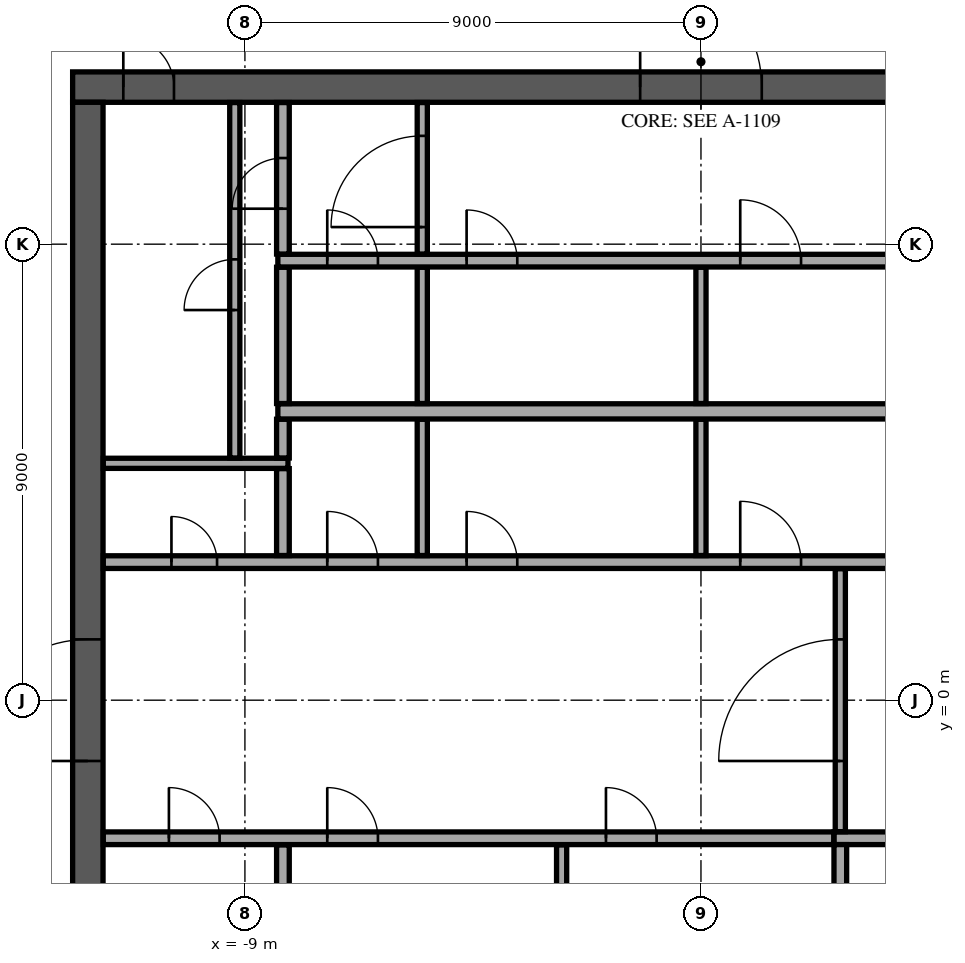
"""IFC4 building model, lengths in metres.
Left out: names, types, materials, properties, quantities, classifications, styles, units other than length and angle.
Written with IfcOpenShell. Run it as: python <this file> out.ifc"""

import sys

from ifc_helpers import new_model, si_unit, direction, frame, frame_2d, origin, place, context, subcontext, project, spatial, rectangle, extrude, element, fill, save


model = new_model("IFC4")
c1 = context("Model", 3, precision=1e-05, world=origin(), true_north=direction((0.0, 1.0)))
c2 = subcontext(c1, "Body", "Model", "MODEL_VIEW")
j1 = project(units=[si_unit("LENGTHUNIT", "METRE"), si_unit("PLANEANGLEUNIT", "RADIAN")], contexts=[c1])
p1 = place(None, origin())
s1 = spatial("IfcSite", under=j1, at=p1, CompositionType="ELEMENT")
p2 = place(p1, origin())
s2 = spatial("IfcBuilding", under=s1, at=p2, CompositionType="ELEMENT")
p3 = place(p2, frame((0.0, 0.0, 350.1)))
s3 = spatial("IfcBuildingStorey", under=s2, at=p3, CompositionType="ELEMENT", Elevation=350.1)
p4 = place(p3, frame((-12.4, 12.1, 0.0), z_axis=(0.0, 0.0, 1.0), x_axis=(1.0, 0.0, 0.0)))
e1 = element("IfcWall", 1, at=p4, inside=s3, PredefinedType="SHEAR", context=c2, shape_type="SweptSolid", body=[
    extrude(rectangle(XDim=24.8, YDim=0.6, at=frame_2d((12.4, 0.0))), origin(), (0.0, 0.0, 1.0), 7.7),
])
p5 = place(p4, frame((11.2, 0.0, 0.0)))
e2 = element("IfcOpeningElement", 2, at=p5, cuts=e1, PredefinedType="OPENING", context=c2, shape_type="SweptSolid", body=[
    extrude(rectangle(XDim=2.4, YDim=2.4, at=frame_2d((1.2, 1.2))), frame((0.0, 0.31, 0.0), z_axis=(0.0, -1.0, 0.0), x_axis=(1.0, 0.0, 0.0)), (0.0, 0.0, 1.0), 0.62),
])
p6 = place(p4, frame((22.025, 0.0, 0.0)))
e3 = element("IfcOpeningElement", 3, at=p6, cuts=e1, PredefinedType="OPENING", context=c2, shape_type="SweptSolid", body=[
    extrude(rectangle(XDim=1.2, YDim=2.1, at=frame_2d((0.6, 1.05))), frame((0.0, 0.31, 0.0), z_axis=(0.0, -1.0, 0.0), x_axis=(1.0, 0.0, 0.0)), (0.0, 0.0, 1.0), 0.62),
])
p7 = place(p4, frame((1.0, 0.0, 0.0)))
e4 = element("IfcOpeningElement", 4, at=p7, cuts=e1, PredefinedType="OPENING", context=c2, shape_type="SweptSolid", body=[
    extrude(rectangle(XDim=1.0, YDim=2.1, at=frame_2d((0.5, 1.05))), frame((0.0, 0.31, 0.0), z_axis=(0.0, -1.0, 0.0), x_axis=(1.0, 0.0, 0.0)), (0.0, 0.0, 1.0), 0.62),
])
p8 = place(p3, frame((-12.1, -11.8, 0.0), z_axis=(0.0, 0.0, 1.0), x_axis=(0.0, 1.0, 0.0)))
e5 = element("IfcWall", 5, at=p8, inside=s3, PredefinedType="SHEAR", context=c2, shape_type="SweptSolid", body=[
    extrude(rectangle(XDim=23.6, YDim=0.6, at=frame_2d((11.8, 0.0))), origin(), (0.0, 0.0, 1.0), 7.7),
])
p9 = place(p8, frame((10.6, 0.0, 0.0)))
e6 = element("IfcOpeningElement", 6, at=p9, cuts=e5, PredefinedType="OPENING", context=c2, shape_type="SweptSolid", body=[
    extrude(rectangle(XDim=2.4, YDim=2.4, at=frame_2d((1.2, 1.2))), frame((0.0, 0.31, 0.0), z_axis=(0.0, -1.0, 0.0), x_axis=(1.0, 0.0, 0.0)), (0.0, 0.0, 1.0), 0.62),
])
p10 = place(p3, frame((2.625, -2.725, 0.0), z_axis=(0.0, 0.0, 1.0), x_axis=(1.0, 0.0, 0.0)))
e7 = element("IfcWall", 7, at=p10, inside=s3, PredefinedType="SOLIDWALL", context=c2, shape_type="SweptSolid", body=[
    extrude(rectangle(XDim=3.0, YDim=0.25, at=frame_2d((1.5, 0.0))), origin(), (0.0, 0.0, 1.0), 7.7),
])
p11 = place(p3, frame((2.75, -5.55, 0.0), z_axis=(0.0, 0.0, 1.0), x_axis=(0.0, 1.0, 0.0)))
e8 = element("IfcWall", 8, at=p11, inside=s3, PredefinedType="SOLIDWALL", context=c2, shape_type="SweptSolid", body=[
    extrude(rectangle(XDim=2.7, YDim=0.25, at=frame_2d((1.35, 0.0))), origin(), (0.0, 0.0, 1.0), 7.7),
])
p12 = place(p3, frame((-8.25, -5.545, 0.0), z_axis=(0.0, 0.0, 1.0), x_axis=(0.0, 1.0, 0.0)))
e9 = element("IfcWall", 9, at=p12, inside=s3, PredefinedType="PARTITIONING", context=c2, shape_type="SweptSolid", body=[
    extrude(rectangle(XDim=2.69, YDim=0.25, at=frame_2d((1.345, 0.0))), origin(), (0.0, 0.0, 1.0), 7.7),
])
p13 = place(p3, frame((-2.75, -5.545, 0.0), z_axis=(0.0, 0.0, 1.0), x_axis=(0.0, 1.0, 0.0)))
e10 = element("IfcWall", 10, at=p13, inside=s3, PredefinedType="PARTITIONING", context=c2, shape_type="SweptSolid", body=[
    extrude(rectangle(XDim=2.69, YDim=0.2, at=frame_2d((1.345, 0.0))), origin(), (0.0, 0.0, 1.0), 7.7),
])
p14 = place(p3, frame((-11.795, -2.725, 0.0), z_axis=(0.0, 0.0, 1.0), x_axis=(1.0, 0.0, 0.0)))
e11 = element("IfcWall", 11, at=p14, inside=s3, PredefinedType="PARTITIONING", context=c2, shape_type="SweptSolid", body=[
    extrude(rectangle(XDim=14.415, YDim=0.25, at=frame_2d((7.208, 0.0))), origin(), (0.0, 0.0, 1.0), 7.7),
])
p15 = place(p14, frame((1.295, 0.0, 0.0)))
e12 = element("IfcOpeningElement", 12, at=p15, cuts=e11, PredefinedType="OPENING", context=c2, shape_type="SweptSolid", body=[
    extrude(rectangle(XDim=1.0, YDim=2.1, at=frame_2d((0.5, 1.05))), frame((0.0, 0.135, 0.0), z_axis=(0.0, -1.0, 0.0), x_axis=(1.0, 0.0, 0.0)), (0.0, 0.0, 1.0), 0.27),
])
p16 = place(p14, frame((4.42, 0.0, 0.0)))
e13 = element("IfcOpeningElement", 13, at=p16, cuts=e11, PredefinedType="OPENING", context=c2, shape_type="SweptSolid", body=[
    extrude(rectangle(XDim=1.0, YDim=2.1, at=frame_2d((0.5, 1.05))), frame((0.0, 0.135, 0.0), z_axis=(0.0, -1.0, 0.0), x_axis=(1.0, 0.0, 0.0)), (0.0, 0.0, 1.0), 0.27),
])
p17 = place(p14, frame((9.92, 0.0, 0.0)))
e14 = element("IfcOpeningElement", 14, at=p17, cuts=e11, PredefinedType="OPENING", context=c2, shape_type="SweptSolid", body=[
    extrude(rectangle(XDim=1.0, YDim=2.1, at=frame_2d((0.5, 1.05))), frame((0.0, 0.135, 0.0), z_axis=(0.0, -1.0, 0.0), x_axis=(1.0, 0.0, 0.0)), (0.0, 0.0, 1.0), 0.27),
])
p18 = place(p3, frame((2.75, -2.595, 0.0), z_axis=(0.0, 0.0, 1.0), x_axis=(0.0, 1.0, 0.0)))
e15 = element("IfcWall", 15, at=p18, inside=s3, PredefinedType="PARTITIONING", context=c2, shape_type="SweptSolid", body=[
    extrude(rectangle(XDim=5.19, YDim=0.2, at=frame_2d((2.595, 0.0))), origin(), (0.0, 0.0, 1.0), 7.7),
])
p19 = place(p18, frame((1.395, 0.0, 0.0)))
e16 = element("IfcOpeningElement", 16, at=p19, cuts=e15, PredefinedType="OPENING", context=c2, shape_type="SweptSolid", body=[
    extrude(rectangle(XDim=2.4, YDim=2.4, at=frame_2d((1.2, 1.2))), frame((0.0, 0.11, 0.0), z_axis=(0.0, -1.0, 0.0), x_axis=(1.0, 0.0, 0.0)), (0.0, 0.0, 1.0), 0.22),
])
p20 = place(p3, frame((-11.795, 2.725, 0.0), z_axis=(0.0, 0.0, 1.0), x_axis=(1.0, 0.0, 0.0)))
e17 = element("IfcWall", 17, at=p20, inside=s3, PredefinedType="PARTITIONING", context=c2, shape_type="SweptSolid", body=[
    extrude(rectangle(XDim=23.59, YDim=0.25, at=frame_2d((11.795, 0.0))), origin(), (0.0, 0.0, 1.0), 7.7),
])
p21 = place(p20, frame((21.345, 0.0, 0.0)))
e18 = element("IfcOpeningElement", 18, at=p21, cuts=e17, PredefinedType="OPENING", context=c2, shape_type="SweptSolid", body=[
    extrude(rectangle(XDim=0.9, YDim=2.1, at=frame_2d((0.45, 1.05))), frame((0.0, 0.135, 0.0), z_axis=(0.0, -1.0, 0.0), x_axis=(1.0, 0.0, 0.0)), (0.0, 0.0, 1.0), 0.27),
])
p22 = place(p20, frame((1.345, 0.0, 0.0)))
e19 = element("IfcOpeningElement", 19, at=p22, cuts=e17, PredefinedType="OPENING", context=c2, shape_type="SweptSolid", body=[
    extrude(rectangle(XDim=0.9, YDim=2.1, at=frame_2d((0.45, 1.05))), frame((0.0, 0.135, 0.0), z_axis=(0.0, -1.0, 0.0), x_axis=(1.0, 0.0, 0.0)), (0.0, 0.0, 1.0), 0.27),
])
p23 = place(p20, frame((4.42, 0.0, 0.0)))
e20 = element("IfcOpeningElement", 20, at=p23, cuts=e17, PredefinedType="OPENING", context=c2, shape_type="SweptSolid", body=[
    extrude(rectangle(XDim=1.0, YDim=2.1, at=frame_2d((0.5, 1.05))), frame((0.0, 0.135, 0.0), z_axis=(0.0, -1.0, 0.0), x_axis=(1.0, 0.0, 0.0)), (0.0, 0.0, 1.0), 0.27),
])
p24 = place(p20, frame((7.17, 0.0, 0.0)))
e21 = element("IfcOpeningElement", 21, at=p24, cuts=e17, PredefinedType="OPENING", context=c2, shape_type="SweptSolid", body=[
    extrude(rectangle(XDim=1.0, YDim=2.1, at=frame_2d((0.5, 1.05))), frame((0.0, 0.135, 0.0), z_axis=(0.0, -1.0, 0.0), x_axis=(1.0, 0.0, 0.0)), (0.0, 0.0, 1.0), 0.27),
])
p25 = place(p20, frame((12.57, 0.0, 0.0)))
e22 = element("IfcOpeningElement", 22, at=p25, cuts=e17, PredefinedType="OPENING", context=c2, shape_type="SweptSolid", body=[
    extrude(rectangle(XDim=1.2, YDim=2.1, at=frame_2d((0.6, 1.05))), frame((0.0, 0.135, 0.0), z_axis=(0.0, -1.0, 0.0), x_axis=(1.0, 0.0, 0.0)), (0.0, 0.0, 1.0), 0.27),
])
p26 = place(p3, frame((-8.25, 2.855, 0.0), z_axis=(0.0, 0.0, 1.0), x_axis=(0.0, 1.0, 0.0)))
e23 = element("IfcWall", 23, at=p26, inside=s3, PredefinedType="PARTITIONING", context=c2, shape_type="SweptSolid", body=[
    extrude(rectangle(XDim=1.715, YDim=0.25, at=frame_2d((0.857, 0.0))), origin(), (0.0, 0.0, 1.0), 7.7),
])
for number, where, z_axis, x_axis in (
    (24, (-5.5, 2.855, 0.0), (0.0, 0.0, 1.0), (0.0, 1.0, 0.0)),
    (25, (0.0, 2.855, 0.0), (0.0, 0.0, 1.0), (0.0, 1.0, 0.0)),
):
    element("IfcWall", number, at=place(p3, frame(where, z_axis=z_axis, x_axis=x_axis)), inside=s3, PredefinedType="PARTITIONING", context=c2, shape_type="SweptSolid", body=[
        extrude(rectangle(XDim=2.69, YDim=0.2, at=frame_2d((1.345, 0.0))), origin(), (0.0, 0.0, 1.0), 7.7),
    ])
p27 = place(p3, frame((-11.795, 4.675, 0.0), z_axis=(0.0, 0.0, 1.0), x_axis=(1.0, 0.0, 0.0)))
e26 = element("IfcWall", 26, at=p27, inside=s3, PredefinedType="PARTITIONING", context=c2, shape_type="SweptSolid", body=[
    extrude(rectangle(XDim=3.645, YDim=0.2, at=frame_2d((1.823, 0.0))), origin(), (0.0, 0.0, 1.0), 7.7),
])
p28 = place(p3, frame((-9.2, 4.78, 0.0), z_axis=(0.0, 0.0, 1.0), x_axis=(0.0, 1.0, 0.0)))
e27 = element("IfcWall", 27, at=p28, inside=s3, PredefinedType="PARTITIONING", context=c2, shape_type="SweptSolid", body=[
    extrude(rectangle(XDim=7.015, YDim=0.2, at=frame_2d((3.507, 0.0))), origin(), (0.0, 0.0, 1.0), 7.7),
])
p29 = place(p28, frame((2.92, 0.0, 0.0)))
e28 = element("IfcOpeningElement", 28, at=p29, cuts=e27, PredefinedType="OPENING", context=c2, shape_type="SweptSolid", body=[
    extrude(rectangle(XDim=1.0, YDim=2.1, at=frame_2d((0.5, 1.05))), frame((0.0, 0.11, 0.0), z_axis=(0.0, -1.0, 0.0), x_axis=(1.0, 0.0, 0.0)), (0.0, 0.0, 1.0), 0.22),
])
p30 = place(p3, frame((-8.25, 4.78, 0.0), z_axis=(0.0, 0.0, 1.0), x_axis=(0.0, 1.0, 0.0)))
e29 = element("IfcWall", 29, at=p30, inside=s3, PredefinedType="PARTITIONING", context=c2, shape_type="SweptSolid", body=[
    extrude(rectangle(XDim=0.765, YDim=0.25, at=frame_2d((0.382, 0.0))), origin(), (0.0, 0.0, 1.0), 7.7),
])
p31 = place(p3, frame((-8.35, 5.7, 0.0), z_axis=(0.0, 0.0, 1.0), x_axis=(1.0, 0.0, 0.0)))
e30 = element("IfcWall", 30, at=p31, inside=s3, PredefinedType="PARTITIONING", context=c2, shape_type="SweptSolid", body=[
    extrude(rectangle(XDim=16.7, YDim=0.3, at=frame_2d((8.35, 0.0))), origin(), (0.0, 0.0, 1.0), 7.7),
])
p32 = place(p3, frame((-8.25, 5.855, 0.0), z_axis=(0.0, 0.0, 1.0), x_axis=(0.0, 1.0, 0.0)))
e31 = element("IfcWall", 31, at=p32, inside=s3, PredefinedType="PARTITIONING", context=c2, shape_type="SweptSolid", body=[
    extrude(rectangle(XDim=2.69, YDim=0.25, at=frame_2d((1.345, 0.0))), origin(), (0.0, 0.0, 1.0), 7.7),
])
for number, where, z_axis, x_axis in (
    (32, (-5.5, 5.855, 0.0), (0.0, 0.0, 1.0), (0.0, 1.0, 0.0)),
    (33, (0.0, 5.855, 0.0), (0.0, 0.0, 1.0), (0.0, 1.0, 0.0)),
):
    element("IfcWall", number, at=place(p3, frame(where, z_axis=z_axis, x_axis=x_axis)), inside=s3, PredefinedType="PARTITIONING", context=c2, shape_type="SweptSolid", body=[
        extrude(rectangle(XDim=2.69, YDim=0.2, at=frame_2d((1.345, 0.0))), origin(), (0.0, 0.0, 1.0), 7.7),
    ])
p33 = place(p3, frame((-8.35, 8.675, 0.0), z_axis=(0.0, 0.0, 1.0), x_axis=(1.0, 0.0, 0.0)))
e34 = element("IfcWall", 34, at=p33, inside=s3, PredefinedType="PARTITIONING", context=c2, shape_type="SweptSolid", body=[
    extrude(rectangle(XDim=16.72, YDim=0.25, at=frame_2d((8.36, 0.0))), origin(), (0.0, 0.0, 1.0), 7.7),
])
p34 = place(p33, frame((0.975, 0.0, 0.0)))
e35 = element("IfcOpeningElement", 35, at=p34, cuts=e34, PredefinedType="OPENING", context=c2, shape_type="SweptSolid", body=[
    extrude(rectangle(XDim=1.0, YDim=2.1, at=frame_2d((0.5, 1.05))), frame((0.0, 0.135, 0.0), z_axis=(0.0, -1.0, 0.0), x_axis=(1.0, 0.0, 0.0)), (0.0, 0.0, 1.0), 0.27),
])
p35 = place(p33, frame((3.725, 0.0, 0.0)))
e36 = element("IfcOpeningElement", 36, at=p35, cuts=e34, PredefinedType="OPENING", context=c2, shape_type="SweptSolid", body=[
    extrude(rectangle(XDim=1.0, YDim=2.1, at=frame_2d((0.5, 1.05))), frame((0.0, 0.135, 0.0), z_axis=(0.0, -1.0, 0.0), x_axis=(1.0, 0.0, 0.0)), (0.0, 0.0, 1.0), 0.27),
])
p36 = place(p33, frame((9.125, 0.0, 0.0)))
e37 = element("IfcOpeningElement", 37, at=p36, cuts=e34, PredefinedType="OPENING", context=c2, shape_type="SweptSolid", body=[
    extrude(rectangle(XDim=1.2, YDim=2.1, at=frame_2d((0.6, 1.05))), frame((0.0, 0.135, 0.0), z_axis=(0.0, -1.0, 0.0), x_axis=(1.0, 0.0, 0.0)), (0.0, 0.0, 1.0), 0.27),
])
p37 = place(p3, frame((-8.25, 8.805, 0.0), z_axis=(0.0, 0.0, 1.0), x_axis=(0.0, 1.0, 0.0)))
e38 = element("IfcWall", 38, at=p37, inside=s3, PredefinedType="PARTITIONING", context=c2, shape_type="SweptSolid", body=[
    extrude(rectangle(XDim=2.99, YDim=0.25, at=frame_2d((1.495, 0.0))), origin(), (0.0, 0.0, 1.0), 7.7),
])
p38 = place(p37, frame((0.895, 0.0, 0.0)))
e39 = element("IfcOpeningElement", 39, at=p38, cuts=e38, PredefinedType="OPENING", context=c2, shape_type="SweptSolid", body=[
    extrude(rectangle(XDim=1.0, YDim=2.1, at=frame_2d((0.5, 1.05))), frame((0.0, 0.135, 0.0), z_axis=(0.0, -1.0, 0.0), x_axis=(1.0, 0.0, 0.0)), (0.0, 0.0, 1.0), 0.27),
])
p39 = place(p3, frame((-5.5, 8.805, 0.0), z_axis=(0.0, 0.0, 1.0), x_axis=(0.0, 1.0, 0.0)))
e40 = element("IfcWall", 40, at=p39, inside=s3, PredefinedType="PARTITIONING", context=c2, shape_type="SweptSolid", body=[
    extrude(rectangle(XDim=2.99, YDim=0.2, at=frame_2d((1.495, 0.0))), origin(), (0.0, 0.0, 1.0), 7.7),
])
p40 = place(p39, frame((0.532, 0.0, 0.0)))
e41 = element("IfcOpeningElement", 41, at=p40, cuts=e40, PredefinedType="OPENING", context=c2, shape_type="SweptSolid", body=[
    extrude(rectangle(XDim=1.8, YDim=2.1, at=frame_2d((0.9, 1.05))), frame((0.0, 0.11, 0.0), z_axis=(0.0, -1.0, 0.0), x_axis=(1.0, 0.0, 0.0)), (0.0, 0.0, 1.0), 0.22),
])
p41 = place(p5, origin())
e42 = element("IfcDoor", 42, at=p41, inside=s3, OperationType="SINGLE_SWING_LEFT", PredefinedType="DOOR", context=c2, shape_type="SweptSolid", body=[
    extrude(rectangle(XDim=2.4, YDim=2.4, at=frame_2d((1.2, 1.2))), frame((0.0, 0.025, 0.0), z_axis=(0.0, -1.0, 0.0), x_axis=(1.0, 0.0, 0.0)), (0.0, 0.0, 1.0), 0.05),
])
fill(e2, e42)
p42 = place(p7, origin())
e43 = element("IfcDoor", 43, at=p42, inside=s3, OperationType="SINGLE_SWING_LEFT", PredefinedType="DOOR", context=c2, shape_type="SweptSolid", body=[
    extrude(rectangle(XDim=1.0, YDim=2.1, at=frame_2d((0.5, 1.05))), frame((0.0, 0.025, 0.0), z_axis=(0.0, -1.0, 0.0), x_axis=(1.0, 0.0, 0.0)), (0.0, 0.0, 1.0), 0.05),
])
fill(e4, e43)
p43 = place(p9, origin())
e44 = element("IfcDoor", 44, at=p43, inside=s3, OperationType="SINGLE_SWING_LEFT", PredefinedType="DOOR", context=c2, shape_type="SweptSolid", body=[
    extrude(rectangle(XDim=2.4, YDim=2.4, at=frame_2d((1.2, 1.2))), frame((0.0, 0.025, 0.0), z_axis=(0.0, -1.0, 0.0), x_axis=(1.0, 0.0, 0.0)), (0.0, 0.0, 1.0), 0.05),
])
fill(e6, e44)
p44 = place(p15, origin())
e45 = element("IfcDoor", 45, at=p44, inside=s3, OperationType="SINGLE_SWING_RIGHT", PredefinedType="DOOR", context=c2, shape_type="SweptSolid", body=[
    extrude(rectangle(XDim=1.0, YDim=2.1, at=frame_2d((0.5, 1.05))), frame((0.0, 0.025, 0.0), z_axis=(0.0, -1.0, 0.0), x_axis=(1.0, 0.0, 0.0)), (0.0, 0.0, 1.0), 0.05),
])
fill(e12, e45)
p45 = place(p22, origin())
e46 = element("IfcDoor", 46, at=p45, inside=s3, OperationType="SINGLE_SWING_RIGHT", PredefinedType="DOOR", context=c2, shape_type="SweptSolid", body=[
    extrude(rectangle(XDim=0.9, YDim=2.1, at=frame_2d((0.45, 1.05))), frame((0.0, 0.025, 0.0), z_axis=(0.0, -1.0, 0.0), x_axis=(1.0, 0.0, 0.0)), (0.0, 0.0, 1.0), 0.05),
])
fill(e19, e46)
p46 = place(p29, origin())
e47 = element("IfcDoor", 47, at=p46, inside=s3, OperationType="SINGLE_SWING_RIGHT", PredefinedType="DOOR", context=c2, shape_type="SweptSolid", body=[
    extrude(rectangle(XDim=1.0, YDim=2.1, at=frame_2d((0.5, 1.05))), frame((0.0, 0.025, 0.0), z_axis=(0.0, -1.0, 0.0), x_axis=(1.0, 0.0, 0.0)), (0.0, 0.0, 1.0), 0.05),
])
fill(e28, e47)
p47 = place(p38, origin())
e48 = element("IfcDoor", 48, at=p47, inside=s3, OperationType="SINGLE_SWING_RIGHT", PredefinedType="DOOR", context=c2, shape_type="SweptSolid", body=[
    extrude(rectangle(XDim=1.0, YDim=2.1, at=frame_2d((0.5, 1.05))), frame((0.0, 0.025, 0.0), z_axis=(0.0, -1.0, 0.0), x_axis=(1.0, 0.0, 0.0)), (0.0, 0.0, 1.0), 0.05),
])
fill(e39, e48)
p48 = place(p23, origin())
e49 = element("IfcDoor", 49, at=p48, inside=s3, OperationType="SINGLE_SWING_RIGHT", PredefinedType="DOOR", context=c2, shape_type="SweptSolid", body=[
    extrude(rectangle(XDim=1.0, YDim=2.1, at=frame_2d((0.5, 1.05))), frame((0.0, 0.025, 0.0), z_axis=(0.0, -1.0, 0.0), x_axis=(1.0, 0.0, 0.0)), (0.0, 0.0, 1.0), 0.05),
])
fill(e20, e49)
p49 = place(p24, origin())
e50 = element("IfcDoor", 50, at=p49, inside=s3, OperationType="SINGLE_SWING_RIGHT", PredefinedType="DOOR", context=c2, shape_type="SweptSolid", body=[
    extrude(rectangle(XDim=1.0, YDim=2.1, at=frame_2d((0.5, 1.05))), frame((0.0, 0.025, 0.0), z_axis=(0.0, -1.0, 0.0), x_axis=(1.0, 0.0, 0.0)), (0.0, 0.0, 1.0), 0.05),
])
fill(e21, e50)
p50 = place(p25, origin())
e51 = element("IfcDoor", 51, at=p50, inside=s3, OperationType="SINGLE_SWING_LEFT", PredefinedType="DOOR", context=c2, shape_type="SweptSolid", body=[
    extrude(rectangle(XDim=1.2, YDim=2.1, at=frame_2d((0.6, 1.05))), frame((0.0, 0.025, 0.0), z_axis=(0.0, -1.0, 0.0), x_axis=(1.0, 0.0, 0.0)), (0.0, 0.0, 1.0), 0.05),
])
fill(e22, e51)
p51 = place(p34, origin())
e52 = element("IfcDoor", 52, at=p51, inside=s3, OperationType="SINGLE_SWING_RIGHT", PredefinedType="DOOR", context=c2, shape_type="SweptSolid", body=[
    extrude(rectangle(XDim=1.0, YDim=2.1, at=frame_2d((0.5, 1.05))), frame((0.0, 0.025, 0.0), z_axis=(0.0, -1.0, 0.0), x_axis=(1.0, 0.0, 0.0)), (0.0, 0.0, 1.0), 0.05),
])
fill(e35, e52)
p52 = place(p35, origin())
e53 = element("IfcDoor", 53, at=p52, inside=s3, OperationType="SINGLE_SWING_RIGHT", PredefinedType="DOOR", context=c2, shape_type="SweptSolid", body=[
    extrude(rectangle(XDim=1.0, YDim=2.1, at=frame_2d((0.5, 1.05))), frame((0.0, 0.025, 0.0), z_axis=(0.0, -1.0, 0.0), x_axis=(1.0, 0.0, 0.0)), (0.0, 0.0, 1.0), 0.05),
])
fill(e36, e53)
p53 = place(p36, origin())
e54 = element("IfcDoor", 54, at=p53, inside=s3, OperationType="SINGLE_SWING_LEFT", PredefinedType="DOOR", context=c2, shape_type="SweptSolid", body=[
    extrude(rectangle(XDim=1.2, YDim=2.1, at=frame_2d((0.6, 1.05))), frame((0.0, 0.025, 0.0), z_axis=(0.0, -1.0, 0.0), x_axis=(1.0, 0.0, 0.0)), (0.0, 0.0, 1.0), 0.05),
])
fill(e37, e54)
p54 = place(p16, origin())
e55 = element("IfcDoor", 55, at=p54, inside=s3, OperationType="SINGLE_SWING_RIGHT", PredefinedType="DOOR", context=c2, shape_type="SweptSolid", body=[
    extrude(rectangle(XDim=1.0, YDim=2.1, at=frame_2d((0.5, 1.05))), frame((0.0, 0.025, 0.0), z_axis=(0.0, -1.0, 0.0), x_axis=(1.0, 0.0, 0.0)), (0.0, 0.0, 1.0), 0.05),
])
fill(e13, e55)
p55 = place(p17, origin())
e56 = element("IfcDoor", 56, at=p55, inside=s3, OperationType="SINGLE_SWING_RIGHT", PredefinedType="DOOR", context=c2, shape_type="SweptSolid", body=[
    extrude(rectangle(XDim=1.0, YDim=2.1, at=frame_2d((0.5, 1.05))), frame((0.0, 0.025, 0.0), z_axis=(0.0, -1.0, 0.0), x_axis=(1.0, 0.0, 0.0)), (0.0, 0.0, 1.0), 0.05),
])
fill(e14, e56)
p56 = place(p19, origin())
e57 = element("IfcDoor", 57, at=p56, inside=s3, OperationType="DOUBLE_DOOR_DOUBLE_SWING", PredefinedType="DOOR", context=c2, shape_type="SweptSolid", body=[
    extrude(rectangle(XDim=2.4, YDim=2.4, at=frame_2d((1.2, 1.2))), frame((0.0, 0.025, 0.0), z_axis=(0.0, -1.0, 0.0), x_axis=(1.0, 0.0, 0.0)), (0.0, 0.0, 1.0), 0.05),
])
fill(e16, e57)
p57 = place(p40, origin())
e58 = element("IfcDoor", 58, at=p57, inside=s3, OperationType="SINGLE_SWING_LEFT", PredefinedType="DOOR", context=c2, shape_type="SweptSolid", body=[
    extrude(rectangle(XDim=1.8, YDim=2.1, at=frame_2d((0.9, 1.05))), frame((0.0, 0.025, 0.0), z_axis=(0.0, -1.0, 0.0), x_axis=(1.0, 0.0, 0.0)), (0.0, 0.0, 1.0), 0.05),
])
fill(e41, e58)
save(model, sys.argv[1])
